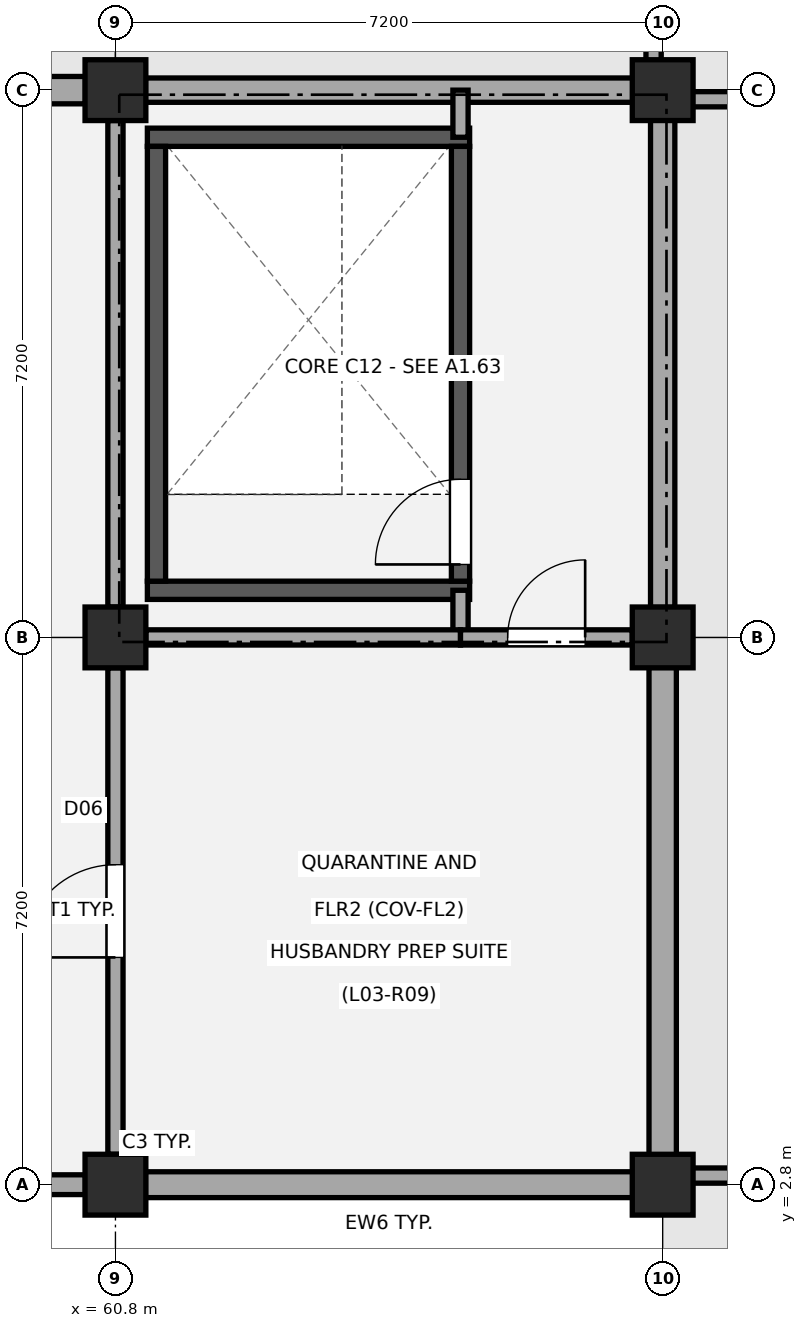
"""IFC4 building model, lengths in metres.
Left out: names, types, materials, properties, quantities, classifications, styles, units other than length and angle.
Written with IfcOpenShell. Run it as: python <this file> out.ifc"""

import sys

from ifc_helpers import new_model, si_unit, direction, frame, frame_2d, origin, origin_2d, place, context, subcontext, project, spatial, rectangle, extrude, element, fill, save


model = new_model("IFC4")
c1 = context("Model", 3, precision=1e-05, world=origin(), true_north=direction((0.0, 1.0)))
c2 = subcontext(c1, "Body", "Model", "MODEL_VIEW")
j1 = project(units=[si_unit("LENGTHUNIT", "METRE"), si_unit("PLANEANGLEUNIT", "RADIAN")], contexts=[c1])
p1 = place(None, origin())
s1 = spatial("IfcSite", under=j1, at=p1, CompositionType="ELEMENT")
p2 = place(p1, origin())
s2 = spatial("IfcBuilding", under=s1, at=p2, CompositionType="ELEMENT")
p3 = place(p2, frame((0.0, 0.0, 13.5)))
s3 = spatial("IfcBuildingStorey", under=s2, at=p3, CompositionType="ELEMENT", Elevation=13.5)
for number, where, z_axis, x_axis in (
    (1, (60.8, 2.8, 0.0), (0.0, 0.0, 1.0), (1.0, 0.0, 0.0)),
    (2, (60.8, 10.0, 0.0), (0.0, 0.0, 1.0), (1.0, 0.0, 0.0)),
    (3, (60.8, 17.2, 0.0), (0.0, 0.0, 1.0), (1.0, 0.0, 0.0)),
    (4, (68.0, 2.8, 0.0), (0.0, 0.0, 1.0), (1.0, 0.0, 0.0)),
    (5, (68.0, 10.0, 0.0), (0.0, 0.0, 1.0), (1.0, 0.0, 0.0)),
    (6, (68.0, 17.2, 0.0), (0.0, 0.0, 1.0), (1.0, 0.0, 0.0)),
):
    element("IfcColumn", number, at=place(p3, frame(where, z_axis=z_axis, x_axis=x_axis)), inside=s3, PredefinedType="COLUMN", context=c2, shape_type="SweptSolid", body=[
        extrude(rectangle(XDim=0.8, YDim=0.8, at=origin_2d()), origin(), (0.0, 0.0, 1.0), 4.14),
    ])
p4 = place(p3, frame((60.405, 2.8, 0.0), z_axis=(0.0, 0.0, 1.0), x_axis=(-1.0, 0.0, 0.0)))
e7 = element("IfcWall", 7, at=p4, inside=s3, PredefinedType="STANDARD", context=c2, shape_type="SweptSolid", body=[
    extrude(rectangle(XDim=6.41, YDim=0.26, at=frame_2d((3.205, 0.0))), origin(), (0.0, 0.0, 1.0), 3.3),
])
p5 = place(p3, frame((53.995, 17.2, 0.0), z_axis=(0.0, 0.0, 1.0), x_axis=(1.0, 0.0, 0.0)))
e8 = element("IfcWall", 8, at=p5, inside=s3, PredefinedType="STANDARD", context=c2, shape_type="SweptSolid", body=[
    extrude(rectangle(XDim=6.41, YDim=0.36, at=frame_2d((3.205, 0.0))), origin(), (0.0, 0.0, 1.0), 3.3),
])
p6 = place(p3, frame((67.605, 2.8, 0.0), z_axis=(0.0, 0.0, 1.0), x_axis=(-1.0, 0.0, 0.0)))
e9 = element("IfcWall", 9, at=p6, inside=s3, PredefinedType="STANDARD", context=c2, shape_type="SweptSolid", body=[
    extrude(rectangle(XDim=6.41, YDim=0.34, at=frame_2d((3.205, 0.0))), origin(), (0.0, 0.0, 1.0), 3.3),
])
p7 = place(p3, frame((61.195, 17.2, 0.0), z_axis=(0.0, 0.0, 1.0), x_axis=(1.0, 0.0, 0.0)))
e10 = element("IfcWall", 10, at=p7, inside=s3, PredefinedType="STANDARD", context=c2, shape_type="SweptSolid", body=[
    extrude(rectangle(XDim=6.41, YDim=0.32, at=frame_2d((3.205, 0.0))), origin(), (0.0, 0.0, 1.0), 3.3),
])
p8 = place(p3, frame((68.0, 9.605, 0.0), z_axis=(0.0, 0.0, 1.0), x_axis=(0.0, -1.0, 0.0)))
e11 = element("IfcWall", 11, at=p8, inside=s3, PredefinedType="STANDARD", context=c2, shape_type="SweptSolid", body=[
    extrude(rectangle(XDim=6.41, YDim=0.36, at=frame_2d((3.205, 0.0))), origin(), (0.0, 0.0, 1.0), 3.3),
])
p9 = place(p3, frame((68.0, 16.805, 0.0), z_axis=(0.0, 0.0, 1.0), x_axis=(0.0, -1.0, 0.0)))
e12 = element("IfcWall", 12, at=p9, inside=s3, PredefinedType="STANDARD", context=c2, shape_type="SweptSolid", body=[
    extrude(rectangle(XDim=6.41, YDim=0.32, at=frame_2d((3.205, 0.0))), origin(), (0.0, 0.0, 1.0), 3.3),
])
for number, where, z_axis, x_axis in (
    (13, (67.88, 17.2, 0.0), (0.0, 0.0, 1.0), (0.0, 1.0, 0.0)),
    (14, (68.0, 2.92, 0.0), (0.0, 0.0, 1.0), (1.0, 0.0, 0.0)),
    (15, (68.0, 17.08, 0.0), (0.0, 0.0, 1.0), (1.0, 0.0, 0.0)),
):
    element("IfcWall", number, at=place(p3, frame(where, z_axis=z_axis, x_axis=x_axis)), inside=s3, PredefinedType="PARAPET", context=c2, shape_type="SweptSolid", body=[
        extrude(rectangle(XDim=7.2, YDim=0.2, at=frame_2d((3.6, 0.0))), origin(), (0.0, 0.0, 1.0), 0.72),
    ])
for number, where, z_axis, x_axis in (
    (16, (61.22, 10.62, 0.0), (0.0, 0.0, 1.0), (1.0, 0.0, 0.0)),
    (17, (61.22, 16.58, 0.0), (0.0, 0.0, 1.0), (1.0, 0.0, 0.0)),
):
    element("IfcWall", number, at=place(p3, frame(where, z_axis=z_axis, x_axis=x_axis)), inside=s3, PredefinedType="SHEAR", context=c2, shape_type="SweptSolid", body=[
        extrude(rectangle(XDim=4.24, YDim=0.24, at=frame_2d((2.12, 0.0))), origin(), (0.0, 0.0, 1.0), 3.86),
    ])
p10 = place(p3, frame((61.34, 10.74, 0.0), z_axis=(0.0, 0.0, 1.0), x_axis=(0.0, 1.0, 0.0)))
e18 = element("IfcWall", 18, at=p10, inside=s3, PredefinedType="SHEAR", context=c2, shape_type="SweptSolid", body=[
    extrude(rectangle(XDim=5.72, YDim=0.24, at=frame_2d((2.86, 0.0))), origin(), (0.0, 0.0, 1.0), 3.86),
])
p11 = place(p3, frame((65.34, 10.74, 0.0), z_axis=(0.0, 0.0, 1.0), x_axis=(0.0, 1.0, 0.0)))
e19 = element("IfcWall", 19, at=p11, inside=s3, PredefinedType="SHEAR", context=c2, shape_type="SweptSolid", body=[
    extrude(rectangle(XDim=5.72, YDim=0.24, at=frame_2d((2.86, 0.0))), origin(), (0.0, 0.0, 1.0), 3.86),
])
p12 = place(p11, frame((0.22, 0.0, 0.0)))
e20 = element("IfcOpeningElement", 20, at=p12, cuts=e19, PredefinedType="OPENING", context=c2, shape_type="SweptSolid", body=[
    extrude(rectangle(XDim=1.12, YDim=2.15, at=frame_2d((0.56, 1.075))), frame((0.0, 0.13, 0.0), z_axis=(0.0, -1.0, 0.0), x_axis=(1.0, 0.0, 0.0)), (0.0, 0.0, 1.0), 0.26),
])
p13 = place(p3, frame((65.34, 10.0, 0.0), z_axis=(0.0, 0.0, 1.0), x_axis=(0.0, 1.0, 0.0)))
e21 = element("IfcWall", 21, at=p13, inside=s3, PredefinedType="PARTITIONING", context=c2, shape_type="SweptSolid", body=[
    extrude(rectangle(XDim=0.62, YDim=0.2, at=frame_2d((0.31, 0.0))), origin(), (0.0, 0.0, 1.0), 3.25),
])
p14 = place(p3, frame((65.34, 16.58, 0.0), z_axis=(0.0, 0.0, 1.0), x_axis=(0.0, 1.0, 0.0)))
e22 = element("IfcWall", 22, at=p14, inside=s3, PredefinedType="PARTITIONING", context=c2, shape_type="SweptSolid", body=[
    extrude(rectangle(XDim=0.62, YDim=0.2, at=frame_2d((0.31, 0.0))), origin(), (0.0, 0.0, 1.0), 3.3),
])
p15 = place(p3, frame((60.8, 10.4, 0.0), z_axis=(0.0, 0.0, 1.0), x_axis=(0.0, 1.0, 0.0)))
e23 = element("IfcWall", 23, at=p15, inside=s3, PredefinedType="PARTITIONING", context=c2, shape_type="SweptSolid", body=[
    extrude(rectangle(XDim=6.4, YDim=0.2, at=frame_2d((3.2, 0.0))), origin(), (0.0, 0.0, 1.0), 3.25),
])
p16 = place(p3, frame((61.2, 10.0, 0.0), z_axis=(0.0, 0.0, 1.0), x_axis=(1.0, 0.0, 0.0)))
e24 = element("IfcWall", 24, at=p16, inside=s3, PredefinedType="PARTITIONING", context=c2, shape_type="SweptSolid", body=[
    extrude(rectangle(XDim=4.14, YDim=0.2, at=frame_2d((2.07, 0.0))), origin(), (0.0, 0.0, 1.0), 3.25),
])
p17 = place(p3, frame((65.34, 10.0, 0.0), z_axis=(0.0, 0.0, 1.0), x_axis=(1.0, 0.0, 0.0)))
e25 = element("IfcWall", 25, at=p17, inside=s3, PredefinedType="PARTITIONING", context=c2, shape_type="SweptSolid", body=[
    extrude(rectangle(XDim=2.26, YDim=0.2, at=frame_2d((1.13, 0.0))), origin(), (0.0, 0.0, 1.0), 3.25),
])
p18 = place(p17, frame((0.62, 0.0, 0.0)))
e26 = element("IfcOpeningElement", 26, at=p18, cuts=e25, PredefinedType="OPENING", context=c2, shape_type="SweptSolid", body=[
    extrude(rectangle(XDim=1.02, YDim=2.15, at=frame_2d((0.51, 1.075))), frame((0.0, 0.11, 0.0), z_axis=(0.0, -1.0, 0.0), x_axis=(1.0, 0.0, 0.0)), (0.0, 0.0, 1.0), 0.22),
])
p19 = place(p3, frame((60.8, 3.2, 0.0), z_axis=(0.0, 0.0, 1.0), x_axis=(0.0, 1.0, 0.0)))
e27 = element("IfcWall", 27, at=p19, inside=s3, PredefinedType="PARTITIONING", context=c2, shape_type="SweptSolid", body=[
    extrude(rectangle(XDim=6.4, YDim=0.2, at=frame_2d((3.2, 0.0))), origin(), (0.0, 0.0, 1.0), 3.2),
])
p20 = place(p19, frame((2.59, 0.0, 0.0)))
e28 = element("IfcOpeningElement", 28, at=p20, cuts=e27, PredefinedType="OPENING", context=c2, shape_type="SweptSolid", body=[
    extrude(rectangle(XDim=1.22, YDim=2.16, at=frame_2d((0.61, 1.08))), frame((0.0, 0.11, 0.0), z_axis=(0.0, -1.0, 0.0), x_axis=(1.0, 0.0, 0.0)), (0.0, 0.0, 1.0), 0.22),
])
p21 = place(p12, origin())
e29 = element("IfcDoor", 29, at=p21, inside=s3, OperationType="SINGLE_SWING_LEFT", PredefinedType="DOOR", context=c2, shape_type="SweptSolid", body=[
    extrude(rectangle(XDim=1.12, YDim=2.15, at=frame_2d((0.56, 1.075))), frame((0.0, 0.025, 0.0), z_axis=(0.0, -1.0, 0.0), x_axis=(1.0, 0.0, 0.0)), (0.0, 0.0, 1.0), 0.05),
])
fill(e20, e29)
p22 = place(p18, origin())
e30 = element("IfcDoor", 30, at=p22, inside=s3, OperationType="SINGLE_SWING_RIGHT", PredefinedType="DOOR", context=c2, shape_type="SweptSolid", body=[
    extrude(rectangle(XDim=1.02, YDim=2.15, at=frame_2d((0.51, 1.075))), frame((0.0, 0.025, 0.0), z_axis=(0.0, -1.0, 0.0), x_axis=(1.0, 0.0, 0.0)), (0.0, 0.0, 1.0), 0.05),
])
fill(e26, e30)
p23 = place(p20, origin())
e31 = element("IfcDoor", 31, at=p23, inside=s3, OperationType="SINGLE_SWING_LEFT", PredefinedType="DOOR", context=c2, shape_type="SweptSolid", body=[
    extrude(rectangle(XDim=1.22, YDim=2.16, at=frame_2d((0.61, 1.08))), frame((0.0, 0.025, 0.0), z_axis=(0.0, -1.0, 0.0), x_axis=(1.0, 0.0, 0.0)), (0.0, 0.0, 1.0), 0.05),
])
fill(e28, e31)
save(model, sys.argv[1])
